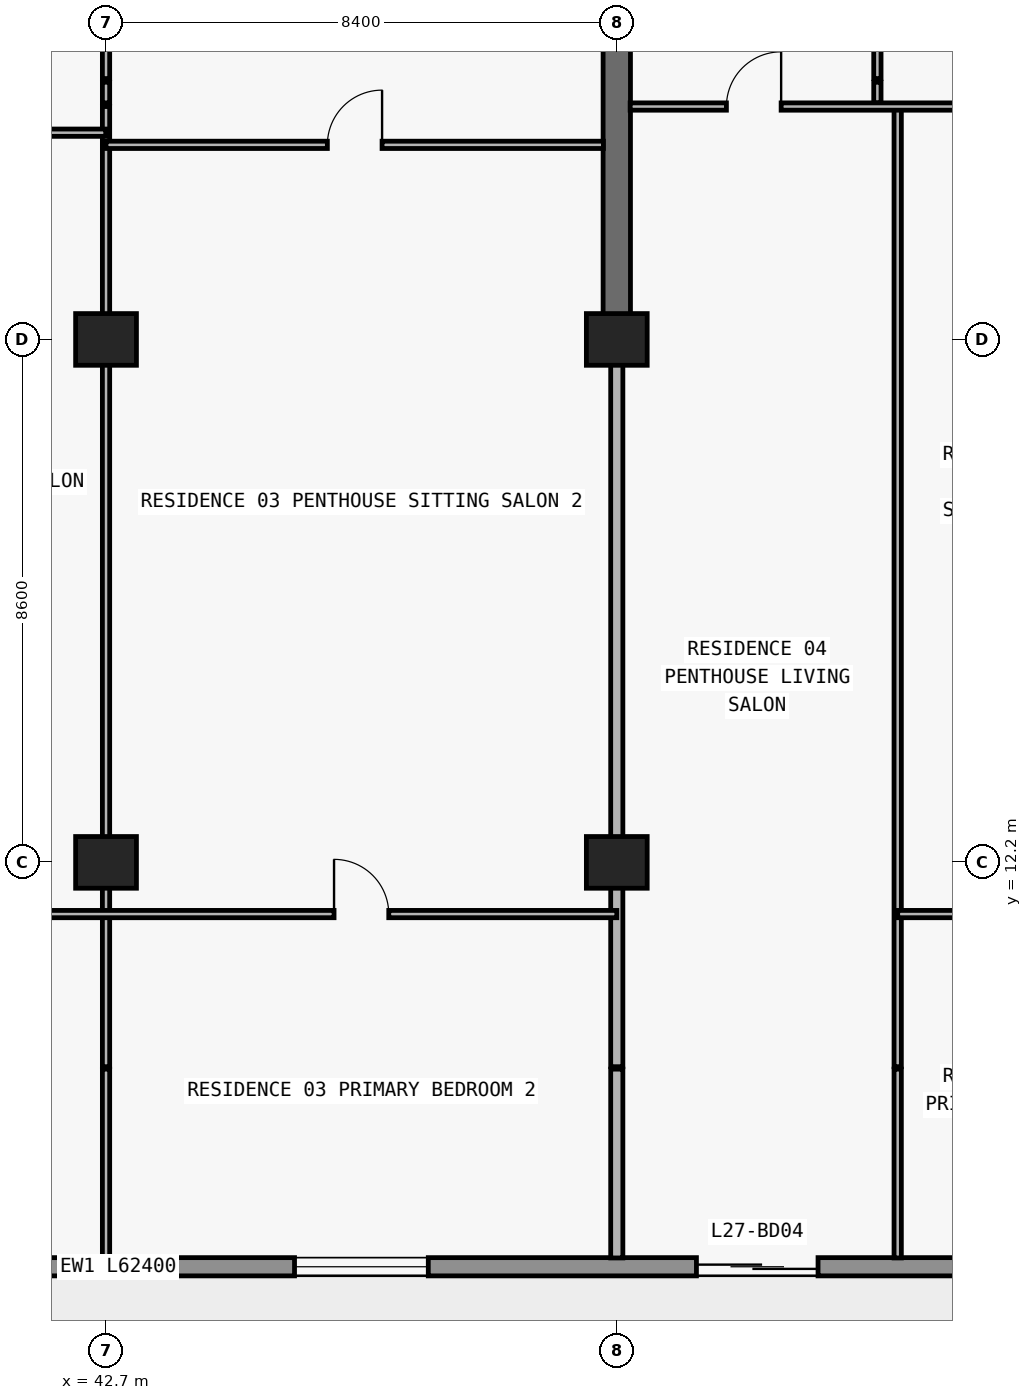
"""IFC4 building model, lengths in metres.
Left out: names, types, materials, properties, quantities, classifications, styles, units other than length and angle.
Written with IfcOpenShell. Run it as: python <this file> out.ifc"""

import sys

from ifc_helpers import new_model, si_unit, direction, frame, frame_2d, origin, origin_2d, place, context, subcontext, project, spatial, rectangle, extrude, element, fill, save


model = new_model("IFC4")
c1 = context("Model", 3, precision=1e-05, world=origin(), true_north=direction((0.0, 1.0)))
c2 = subcontext(c1, "Body", "Model", "MODEL_VIEW")
j1 = project(units=[si_unit("LENGTHUNIT", "METRE"), si_unit("PLANEANGLEUNIT", "RADIAN")], contexts=[c1])
p1 = place(None, origin())
s1 = spatial("IfcSite", under=j1, at=p1, CompositionType="ELEMENT")
p2 = place(p1, origin())
s2 = spatial("IfcBuilding", under=s1, at=p2, CompositionType="ELEMENT")
p3 = place(p2, frame((0.0, 0.0, 102.6)))
s3 = spatial("IfcBuildingStorey", under=s2, at=p3, CompositionType="ELEMENT", Elevation=102.6)
for number, where, z_axis, x_axis in (
    (1, (42.7, 12.2, 0.0), (0.0, 0.0, 1.0), (1.0, 0.0, 0.0)),
    (2, (51.1, 12.2, 0.0), (0.0, 0.0, 1.0), (1.0, 0.0, 0.0)),
    (3, (42.7, 20.8, 0.0), (0.0, 0.0, 1.0), (1.0, 0.0, 0.0)),
    (4, (51.1, 20.8, 0.0), (0.0, 0.0, 1.0), (1.0, 0.0, 0.0)),
):
    element("IfcColumn", number, at=place(p3, frame(where, z_axis=z_axis, x_axis=x_axis)), inside=s3, PredefinedType="COLUMN", context=c2, shape_type="SweptSolid", body=[
        extrude(rectangle(XDim=1.0, YDim=0.85, at=origin_2d()), origin(), (0.0, 0.0, 1.0), 3.05),
    ])
p4 = place(p3, frame((51.1, 20.8, 0.0), z_axis=(0.0, 0.0, 1.0), x_axis=(0.0, 1.0, 0.0)))
e5 = element("IfcWall", 5, at=p4, inside=s3, PredefinedType="SHEAR", context=c2, shape_type="SweptSolid", body=[
    extrude(rectangle(XDim=8.6, YDim=0.45, at=frame_2d((4.3, 0.0))), origin(), (0.0, 0.0, 1.0), 3.05),
])
p5 = place(p3, frame((70.1, 5.55, 0.0), z_axis=(0.0, 0.0, 1.0), x_axis=(-1.0, 0.0, 0.0)))
e6 = element("IfcWall", 6, at=p5, inside=s3, PredefinedType="STANDARD", context=c2, shape_type="SweptSolid", body=[
    extrude(rectangle(XDim=62.4, YDim=0.3, at=frame_2d((31.2, 0.0))), origin(), (0.0, 0.0, 1.0), 3.05),
])
p6 = place(p5, frame((57.226, 0.0, 0.0)))
e7 = element("IfcOpeningElement", 7, at=p6, cuts=e6, PredefinedType="OPENING", context=c2, shape_type="SweptSolid", body=[
    extrude(rectangle(XDim=2.0, YDim=2.3, at=frame_2d((1.0, 1.15))), frame((0.0, 0.16, 0.0), z_axis=(0.0, -1.0, 0.0), x_axis=(1.0, 0.0, 0.0)), (0.0, 0.0, 1.0), 0.32),
])
p7 = place(p5, frame((52.926, 0.0, 0.85)))
e8 = element("IfcOpeningElement", 8, at=p7, cuts=e6, PredefinedType="OPENING", context=c2, shape_type="SweptSolid", body=[
    extrude(rectangle(XDim=2.2, YDim=1.55, at=frame_2d((1.1, 0.775))), frame((0.0, 0.16, 0.0), z_axis=(0.0, -1.0, 0.0), x_axis=(1.0, 0.0, 0.0)), (0.0, 0.0, 1.0), 0.32),
])
p8 = place(p5, frame((48.49, 0.0, 0.0)))
e9 = element("IfcOpeningElement", 9, at=p8, cuts=e6, PredefinedType="OPENING", context=c2, shape_type="SweptSolid", body=[
    extrude(rectangle(XDim=2.0, YDim=2.3, at=frame_2d((1.0, 1.15))), frame((0.0, 0.16, 0.0), z_axis=(0.0, -1.0, 0.0), x_axis=(1.0, 0.0, 0.0)), (0.0, 0.0, 1.0), 0.32),
])
p9 = place(p5, frame((44.39, 0.0, 0.85)))
e10 = element("IfcOpeningElement", 10, at=p9, cuts=e6, PredefinedType="OPENING", context=c2, shape_type="SweptSolid", body=[
    extrude(rectangle(XDim=1.8, YDim=1.55, at=frame_2d((0.9, 0.775))), frame((0.0, 0.16, 0.0), z_axis=(0.0, -1.0, 0.0), x_axis=(1.0, 0.0, 0.0)), (0.0, 0.0, 1.0), 0.32),
])
p10 = place(p5, frame((40.49, 0.0, 0.0)))
e11 = element("IfcOpeningElement", 11, at=p10, cuts=e6, PredefinedType="OPENING", context=c2, shape_type="SweptSolid", body=[
    extrude(rectangle(XDim=2.0, YDim=2.3, at=frame_2d((1.0, 1.15))), frame((0.0, 0.16, 0.0), z_axis=(0.0, -1.0, 0.0), x_axis=(1.0, 0.0, 0.0)), (0.0, 0.0, 1.0), 0.32),
])
p11 = place(p5, frame((35.81, 0.0, 0.65)))
e12 = element("IfcOpeningElement", 12, at=p11, cuts=e6, PredefinedType="OPENING", context=c2, shape_type="SweptSolid", body=[
    extrude(rectangle(XDim=2.6, YDim=1.85, at=frame_2d((1.3, 0.925))), frame((0.0, 0.16, 0.0), z_axis=(0.0, -1.0, 0.0), x_axis=(1.0, 0.0, 0.0)), (0.0, 0.0, 1.0), 0.32),
])
p12 = place(p5, frame((30.1, 0.0, 0.85)))
e13 = element("IfcOpeningElement", 13, at=p12, cuts=e6, PredefinedType="OPENING", context=c2, shape_type="SweptSolid", body=[
    extrude(rectangle(XDim=2.2, YDim=1.55, at=frame_2d((1.1, 0.775))), frame((0.0, 0.16, 0.0), z_axis=(0.0, -1.0, 0.0), x_axis=(1.0, 0.0, 0.0)), (0.0, 0.0, 1.0), 0.32),
])
p13 = place(p5, frame((22.1, 0.0, 0.85)))
e14 = element("IfcOpeningElement", 14, at=p13, cuts=e6, PredefinedType="OPENING", context=c2, shape_type="SweptSolid", body=[
    extrude(rectangle(XDim=2.2, YDim=1.55, at=frame_2d((1.1, 0.775))), frame((0.0, 0.16, 0.0), z_axis=(0.0, -1.0, 0.0), x_axis=(1.0, 0.0, 0.0)), (0.0, 0.0, 1.0), 0.32),
])
p14 = place(p5, frame((15.69, 0.0, 0.0)))
e15 = element("IfcOpeningElement", 15, at=p14, cuts=e6, PredefinedType="OPENING", context=c2, shape_type="SweptSolid", body=[
    extrude(rectangle(XDim=2.0, YDim=2.3, at=frame_2d((1.0, 1.15))), frame((0.0, 0.16, 0.0), z_axis=(0.0, -1.0, 0.0), x_axis=(1.0, 0.0, 0.0)), (0.0, 0.0, 1.0), 0.32),
])
p15 = place(p5, frame((11.59, 0.0, 0.85)))
e16 = element("IfcOpeningElement", 16, at=p15, cuts=e6, PredefinedType="OPENING", context=c2, shape_type="SweptSolid", body=[
    extrude(rectangle(XDim=1.8, YDim=1.55, at=frame_2d((0.9, 0.775))), frame((0.0, 0.16, 0.0), z_axis=(0.0, -1.0, 0.0), x_axis=(1.0, 0.0, 0.0)), (0.0, 0.0, 1.0), 0.32),
])
p16 = place(p5, frame((7.626, 0.0, 0.0)))
e17 = element("IfcOpeningElement", 17, at=p16, cuts=e6, PredefinedType="OPENING", context=c2, shape_type="SweptSolid", body=[
    extrude(rectangle(XDim=2.0, YDim=2.3, at=frame_2d((1.0, 1.15))), frame((0.0, 0.16, 0.0), z_axis=(0.0, -1.0, 0.0), x_axis=(1.0, 0.0, 0.0)), (0.0, 0.0, 1.0), 0.32),
])
p17 = place(p5, frame((3.326, 0.0, 0.85)))
e18 = element("IfcOpeningElement", 18, at=p17, cuts=e6, PredefinedType="OPENING", context=c2, shape_type="SweptSolid", body=[
    extrude(rectangle(XDim=2.2, YDim=1.55, at=frame_2d((1.1, 0.775))), frame((0.0, 0.16, 0.0), z_axis=(0.0, -1.0, 0.0), x_axis=(1.0, 0.0, 0.0)), (0.0, 0.0, 1.0), 0.32),
])
p18 = place(p3, frame((42.7, 5.695, 0.0), z_axis=(0.0, 0.0, 1.0), x_axis=(0.0, 1.0, 0.0)))
e19 = element("IfcWall", 19, at=p18, inside=s3, PredefinedType="PARTITIONING", context=c2, shape_type="SweptSolid", body=[
    extrude(rectangle(XDim=3.105, YDim=0.12, at=frame_2d((1.552, 0.0))), origin(), (0.0, 0.0, 1.0), 3.05),
])
p19 = place(p3, frame((42.7, 8.84, 0.0), z_axis=(0.0, 0.0, 1.0), x_axis=(0.0, 1.0, 0.0)))
e20 = element("IfcWall", 20, at=p19, inside=s3, PredefinedType="PARTITIONING", context=c2, shape_type="SweptSolid", body=[
    extrude(rectangle(XDim=15.79, YDim=0.12, at=frame_2d((7.895, 0.0))), origin(), (0.0, 0.0, 1.0), 2.174),
])
p20 = place(p3, frame((42.7, 24.69, 0.0), z_axis=(0.0, 0.0, 1.0), x_axis=(0.0, 1.0, 0.0)))
e21 = element("IfcWall", 21, at=p20, inside=s3, PredefinedType="PARTITIONING", context=c2, shape_type="SweptSolid", body=[
    extrude(rectangle(XDim=0.34, YDim=0.12, at=frame_2d((0.17, 0.0))), origin(), (0.0, 0.0, 1.0), 2.174),
])
p21 = place(p3, frame((42.7, 25.09, 0.0), z_axis=(0.0, 0.0, 1.0), x_axis=(0.0, 1.0, 0.0)))
e22 = element("IfcWall", 22, at=p21, inside=s3, PredefinedType="PARTITIONING", context=c2, shape_type="SweptSolid", body=[
    extrude(rectangle(XDim=4.69, YDim=0.12, at=frame_2d((2.345, 0.0))), origin(), (0.0, 0.0, 1.0), 2.174),
])
p22 = place(p21, frame((1.305, 0.0, 0.0)))
e23 = element("IfcOpeningElement", 23, at=p22, cuts=e22, PredefinedType="OPENING", context=c2, shape_type="SweptSolid", body=[
    extrude(rectangle(XDim=0.9, YDim=2.124, at=frame_2d((0.45, 1.062))), frame((0.0, 0.07, 0.0), z_axis=(0.0, -1.0, 0.0), x_axis=(1.0, 0.0, 0.0)), (0.0, 0.0, 1.0), 0.14),
])
p23 = place(p3, frame((51.1, 5.695, 0.0), z_axis=(0.0, 0.0, 1.0), x_axis=(0.0, 1.0, 0.0)))
e24 = element("IfcWall", 24, at=p23, inside=s3, PredefinedType="PARTITIONING", context=c2, shape_type="SweptSolid", body=[
    extrude(rectangle(XDim=3.105, YDim=0.2, at=frame_2d((1.552, 0.0))), origin(), (0.0, 0.0, 1.0), 3.05),
])
p24 = place(p3, frame((51.1, 8.84, 0.0), z_axis=(0.0, 0.0, 1.0), x_axis=(0.0, 1.0, 0.0)))
e25 = element("IfcWall", 25, at=p24, inside=s3, PredefinedType="PARTITIONING", context=c2, shape_type="SweptSolid", body=[
    extrude(rectangle(XDim=11.955, YDim=0.2, at=frame_2d((5.978, 0.0))), origin(), (0.0, 0.0, 1.0), 2.174),
])
p25 = place(p3, frame((55.386, 24.69, 0.0), z_axis=(0.0, 0.0, 1.0), x_axis=(0.0, 1.0, 0.0)))
e26 = element("IfcWall", 26, at=p25, inside=s3, PredefinedType="PARTITIONING", context=c2, shape_type="SweptSolid", body=[
    extrude(rectangle(XDim=0.34, YDim=0.12, at=frame_2d((0.17, 0.0))), origin(), (0.0, 0.0, 1.0), 3.05),
])
p26 = place(p3, frame((55.386, 25.09, 0.0), z_axis=(0.0, 0.0, 1.0), x_axis=(0.0, 1.0, 0.0)))
e27 = element("IfcWall", 27, at=p26, inside=s3, PredefinedType="PARTITIONING", context=c2, shape_type="SweptSolid", body=[
    extrude(rectangle(XDim=4.69, YDim=0.12, at=frame_2d((2.345, 0.0))), origin(), (0.0, 0.0, 1.0), 2.725),
])
p27 = place(p26, frame((1.895, 0.0, 0.0)))
e28 = element("IfcOpeningElement", 28, at=p27, cuts=e27, PredefinedType="OPENING", context=c2, shape_type="SweptSolid", body=[
    extrude(rectangle(XDim=0.9, YDim=2.15, at=frame_2d((0.45, 1.075))), frame((0.0, 0.07, 0.0), z_axis=(0.0, -1.0, 0.0), x_axis=(1.0, 0.0, 0.0)), (0.0, 0.0, 1.0), 0.14),
])
p28 = place(p3, frame((55.72, 5.695, 0.0), z_axis=(0.0, 0.0, 1.0), x_axis=(0.0, 1.0, 0.0)))
e29 = element("IfcWall", 29, at=p28, inside=s3, PredefinedType="PARTITIONING", context=c2, shape_type="SweptSolid", body=[
    extrude(rectangle(XDim=3.105, YDim=0.12, at=frame_2d((1.552, 0.0))), origin(), (0.0, 0.0, 1.0), 3.05),
])
p29 = place(p3, frame((55.72, 8.84, 0.0), z_axis=(0.0, 0.0, 1.0), x_axis=(0.0, 1.0, 0.0)))
e30 = element("IfcWall", 30, at=p29, inside=s3, PredefinedType="PARTITIONING", context=c2, shape_type="SweptSolid", body=[
    extrude(rectangle(XDim=15.79, YDim=0.12, at=frame_2d((7.895, 0.0))), origin(), (0.0, 0.0, 1.0), 3.05),
])
p30 = place(p3, frame((35.1, 11.35, 0.0), z_axis=(0.0, 0.0, 1.0), x_axis=(1.0, 0.0, 0.0)))
e31 = element("IfcWall", 31, at=p30, inside=s3, PredefinedType="PARTITIONING", context=c2, shape_type="SweptSolid", body=[
    extrude(rectangle(XDim=16.0, YDim=0.12, at=frame_2d((8.0, 0.0))), origin(), (0.0, 0.0, 1.0), 3.05),
])
p31 = place(p30, frame((3.35, 0.0, 0.0)))
e32 = element("IfcOpeningElement", 32, at=p31, cuts=e31, PredefinedType="OPENING", context=c2, shape_type="SweptSolid", body=[
    extrude(rectangle(XDim=0.9, YDim=2.15, at=frame_2d((0.45, 1.075))), frame((0.0, 0.07, 0.0), z_axis=(0.0, -1.0, 0.0), x_axis=(1.0, 0.0, 0.0)), (0.0, 0.0, 1.0), 0.14),
])
p32 = place(p30, frame((11.35, 0.0, 0.0)))
e33 = element("IfcOpeningElement", 33, at=p32, cuts=e31, PredefinedType="OPENING", context=c2, shape_type="SweptSolid", body=[
    extrude(rectangle(XDim=0.9, YDim=2.15, at=frame_2d((0.45, 1.075))), frame((0.0, 0.07, 0.0), z_axis=(0.0, -1.0, 0.0), x_axis=(1.0, 0.0, 0.0)), (0.0, 0.0, 1.0), 0.14),
])
p33 = place(p3, frame((55.72, 11.35, 0.0), z_axis=(0.0, 0.0, 1.0), x_axis=(1.0, 0.0, 0.0)))
e34 = element("IfcWall", 34, at=p33, inside=s3, PredefinedType="PARTITIONING", context=c2, shape_type="SweptSolid", body=[
    extrude(rectangle(XDim=3.78, YDim=0.12, at=frame_2d((1.89, 0.0))), origin(), (0.0, 0.0, 1.0), 3.05),
])
p34 = place(p33, frame((1.44, 0.0, 0.0)))
e35 = element("IfcOpeningElement", 35, at=p34, cuts=e34, PredefinedType="OPENING", context=c2, shape_type="SweptSolid", body=[
    extrude(rectangle(XDim=0.9, YDim=2.15, at=frame_2d((0.45, 1.075))), frame((0.0, 0.07, 0.0), z_axis=(0.0, -1.0, 0.0), x_axis=(1.0, 0.0, 0.0)), (0.0, 0.0, 1.0), 0.14),
])
p35 = place(p3, frame((42.7, 24.0, 0.0), z_axis=(0.0, 0.0, 1.0), x_axis=(1.0, 0.0, 0.0)))
e36 = element("IfcWall", 36, at=p35, inside=s3, PredefinedType="PARTITIONING", context=c2, shape_type="SweptSolid", body=[
    extrude(rectangle(XDim=8.18, YDim=0.12, at=frame_2d((4.09, 0.0))), origin(), (0.0, 0.0, 1.0), 3.05),
])
p36 = place(p35, frame((3.64, 0.0, 0.0)))
e37 = element("IfcOpeningElement", 37, at=p36, cuts=e36, PredefinedType="OPENING", context=c2, shape_type="SweptSolid", body=[
    extrude(rectangle(XDim=0.9, YDim=2.15, at=frame_2d((0.45, 1.075))), frame((0.0, 0.07, 0.0), z_axis=(0.0, -1.0, 0.0), x_axis=(1.0, 0.0, 0.0)), (0.0, 0.0, 1.0), 0.14),
])
p37 = place(p3, frame((35.105, 24.2, 0.0), z_axis=(0.0, 0.0, 1.0), x_axis=(1.0, 0.0, 0.0)))
e38 = element("IfcWall", 38, at=p37, inside=s3, PredefinedType="PARTITIONING", context=c2, shape_type="SweptSolid", body=[
    extrude(rectangle(XDim=7.59, YDim=0.12, at=frame_2d((3.795, 0.0))), origin(), (0.0, 0.0, 1.0), 3.05),
])
p38 = place(p37, frame((3.345, 0.0, 0.0)))
e39 = element("IfcOpeningElement", 39, at=p38, cuts=e38, PredefinedType="OPENING", context=c2, shape_type="SweptSolid", body=[
    extrude(rectangle(XDim=0.9, YDim=2.15, at=frame_2d((0.45, 1.075))), frame((0.0, 0.07, 0.0), z_axis=(0.0, -1.0, 0.0), x_axis=(1.0, 0.0, 0.0)), (0.0, 0.0, 1.0), 0.14),
])
p39 = place(p3, frame((51.32, 24.63, 0.0), z_axis=(0.0, 0.0, 1.0), x_axis=(1.0, 0.0, 0.0)))
e40 = element("IfcWall", 40, at=p39, inside=s3, PredefinedType="PARTITIONING", context=c2, shape_type="SweptSolid", body=[
    extrude(rectangle(XDim=8.18, YDim=0.12, at=frame_2d((4.09, 0.0))), origin(), (0.0, 0.0, 1.0), 3.05),
])
p40 = place(p39, frame((1.583, 0.0, 0.0)))
e41 = element("IfcOpeningElement", 41, at=p40, cuts=e40, PredefinedType="OPENING", context=c2, shape_type="SweptSolid", body=[
    extrude(rectangle(XDim=0.9, YDim=2.15, at=frame_2d((0.45, 1.075))), frame((0.0, 0.07, 0.0), z_axis=(0.0, -1.0, 0.0), x_axis=(1.0, 0.0, 0.0)), (0.0, 0.0, 1.0), 0.14),
])
p41 = place(p39, frame((5.84, 0.0, 0.0)))
e42 = element("IfcOpeningElement", 42, at=p41, cuts=e40, PredefinedType="OPENING", context=c2, shape_type="SweptSolid", body=[
    extrude(rectangle(XDim=0.9, YDim=2.15, at=frame_2d((0.45, 1.075))), frame((0.0, 0.07, 0.0), z_axis=(0.0, -1.0, 0.0), x_axis=(1.0, 0.0, 0.0)), (0.0, 0.0, 1.0), 0.14),
])
p42 = place(p13, origin())
e43 = element("IfcWindow", 43, at=p42, inside=s3, PartitioningType="SINGLE_PANEL", PredefinedType="WINDOW", context=c2, shape_type="SweptSolid", body=[
    extrude(rectangle(XDim=2.2, YDim=1.55, at=frame_2d((1.1, 0.775))), frame((0.0, 0.03, 0.0), z_axis=(0.0, -1.0, 0.0), x_axis=(1.0, 0.0, 0.0)), (0.0, 0.0, 1.0), 0.06),
])
fill(e14, e43)
p43 = place(p14, origin())
e44 = element("IfcDoor", 44, at=p43, inside=s3, OperationType="DOUBLE_DOOR_SLIDING", PredefinedType="DOOR", context=c2, shape_type="SweptSolid", body=[
    extrude(rectangle(XDim=2.0, YDim=2.3, at=frame_2d((1.0, 1.15))), frame((0.0, 0.025, 0.0), z_axis=(0.0, -1.0, 0.0), x_axis=(1.0, 0.0, 0.0)), (0.0, 0.0, 1.0), 0.05),
])
fill(e15, e44)
p44 = place(p36, origin())
e45 = element("IfcDoor", 45, at=p44, inside=s3, OperationType="SINGLE_SWING_RIGHT", PredefinedType="DOOR", context=c2, shape_type="SweptSolid", body=[
    extrude(rectangle(XDim=0.9, YDim=2.15, at=frame_2d((0.45, 1.075))), frame((0.0, 0.025, 0.0), z_axis=(0.0, -1.0, 0.0), x_axis=(1.0, 0.0, 0.0)), (0.0, 0.0, 1.0), 0.05),
])
fill(e37, e45)
p45 = place(p32, origin())
e46 = element("IfcDoor", 46, at=p45, inside=s3, OperationType="SINGLE_SWING_LEFT", PredefinedType="DOOR", context=c2, shape_type="SweptSolid", body=[
    extrude(rectangle(XDim=0.9, YDim=2.15, at=frame_2d((0.45, 1.075))), frame((0.0, 0.025, 0.0), z_axis=(0.0, -1.0, 0.0), x_axis=(1.0, 0.0, 0.0)), (0.0, 0.0, 1.0), 0.05),
])
fill(e33, e46)
p46 = place(p40, origin())
e47 = element("IfcDoor", 47, at=p46, inside=s3, OperationType="SINGLE_SWING_RIGHT", PredefinedType="DOOR", context=c2, shape_type="SweptSolid", body=[
    extrude(rectangle(XDim=0.9, YDim=2.15, at=frame_2d((0.45, 1.075))), frame((0.0, 0.025, 0.0), z_axis=(0.0, -1.0, 0.0), x_axis=(1.0, 0.0, 0.0)), (0.0, 0.0, 1.0), 0.05),
])
fill(e41, e47)
save(model, sys.argv[1])
